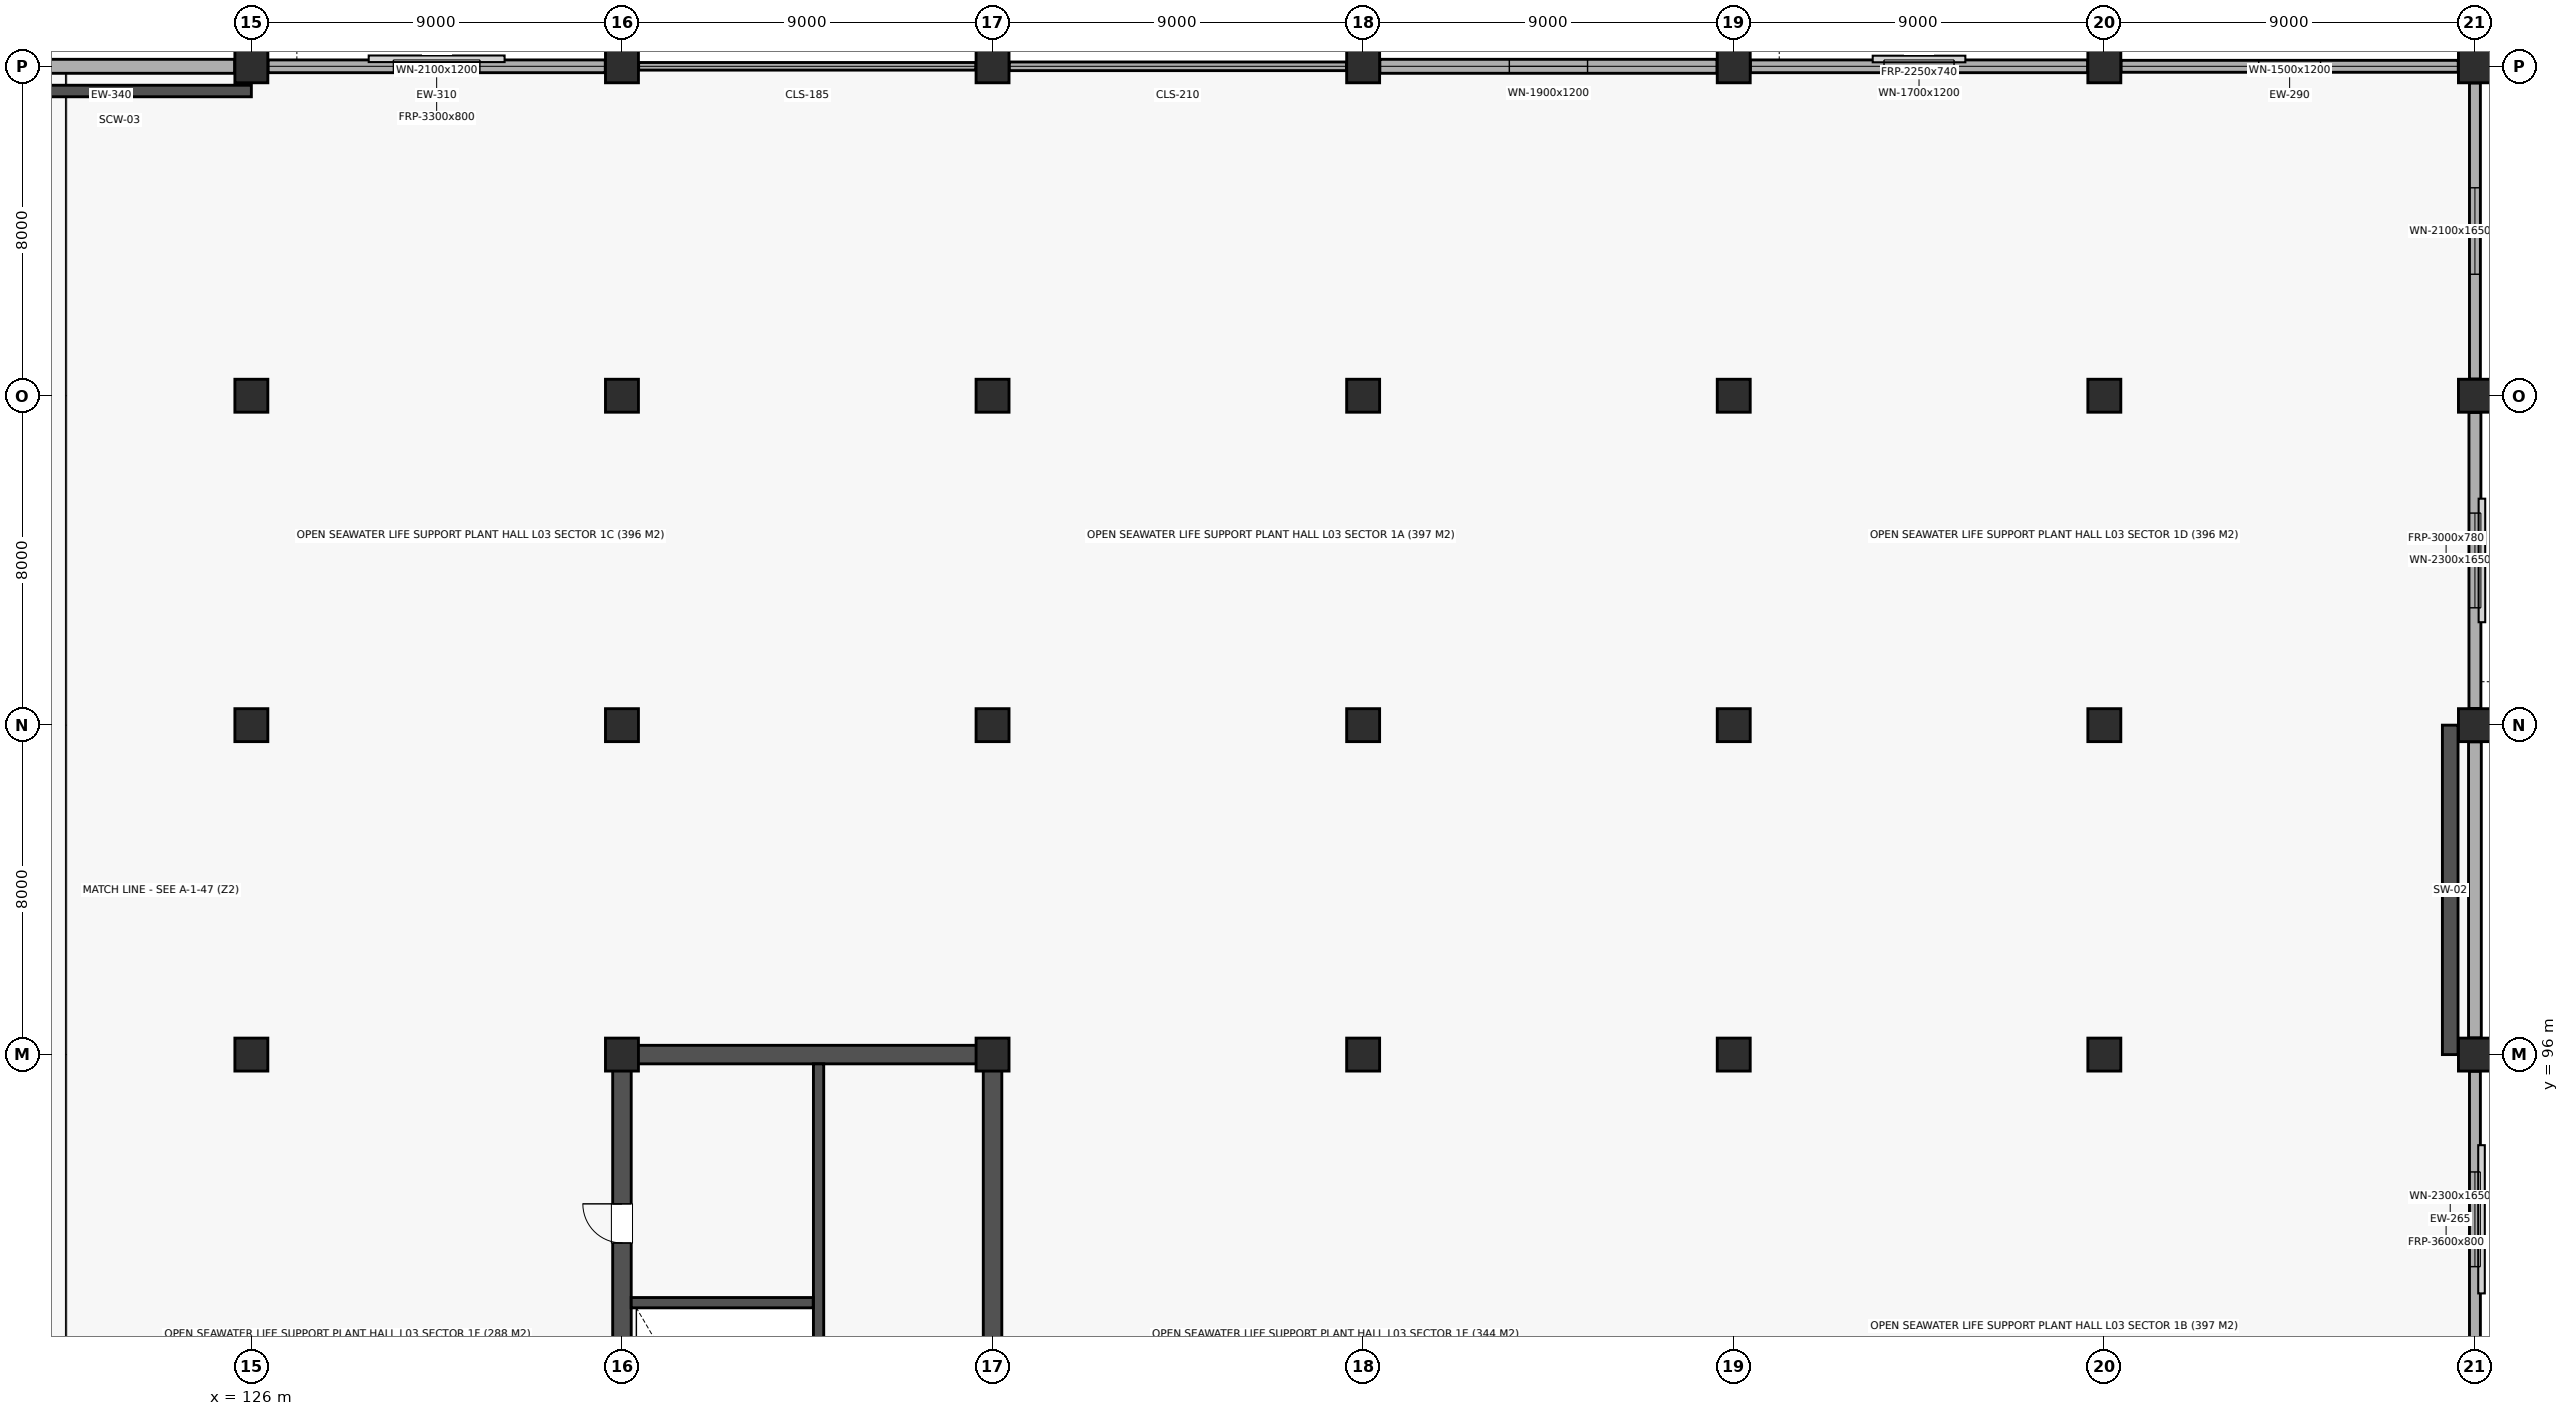
"""IFC4 building model, lengths in metres.
Left out: names, types, materials, properties, quantities, classifications, styles, units other than length and angle.
Written with IfcOpenShell. Run it as: python <this file> out.ifc"""

import sys

from ifc_helpers import new_model, si_unit, direction, frame, frame_2d, origin, origin_2d, place, context, subcontext, project, spatial, rectangle, extrude, element, fill, save


model = new_model("IFC4")
c1 = context("Model", 3, precision=1e-05, world=origin(), true_north=direction((0.0, 1.0)))
c2 = subcontext(c1, "Body", "Model", "MODEL_VIEW")
j1 = project(units=[si_unit("LENGTHUNIT", "METRE"), si_unit("PLANEANGLEUNIT", "RADIAN")], contexts=[c1])
p1 = place(None, origin())
s1 = spatial("IfcSite", under=j1, at=p1, CompositionType="ELEMENT")
p2 = place(p1, origin())
s2 = spatial("IfcBuilding", under=s1, at=p2, CompositionType="ELEMENT")
p3 = place(p2, frame((0.0, 0.0, 13.5)))
s3 = spatial("IfcBuildingStorey", under=s2, at=p3, CompositionType="ELEMENT", Elevation=13.5)
for number, where, z_axis, x_axis in (
    (1, (126.0, 96.0, 0.0), (0.0, 0.0, 1.0), (1.0, 0.0, 0.0)),
    (2, (126.0, 104.0, 0.0), (0.0, 0.0, 1.0), (1.0, 0.0, 0.0)),
    (3, (126.0, 112.0, 0.0), (0.0, 0.0, 1.0), (1.0, 0.0, 0.0)),
):
    element("IfcColumn", number, at=place(p3, frame(where, z_axis=z_axis, x_axis=x_axis)), inside=s3, PredefinedType="COLUMN", context=c2, shape_type="SweptSolid", body=[
        extrude(rectangle(XDim=0.8, YDim=0.8, at=origin_2d()), origin(), (0.0, 0.0, 1.0), 4.23),
    ])
p4 = place(p3, frame((126.0, 120.0, 0.0), z_axis=(0.0, 0.0, 1.0), x_axis=(1.0, 0.0, 0.0)))
e4 = element("IfcColumn", 4, at=p4, inside=s3, PredefinedType="COLUMN", context=c2, shape_type="SweptSolid", body=[
    extrude(rectangle(XDim=0.8, YDim=0.8, at=origin_2d()), origin(), (0.0, 0.0, 1.0), 4.2),
])
for number, where, z_axis, x_axis in (
    (5, (135.0, 96.0, 0.0), (0.0, 0.0, 1.0), (1.0, 0.0, 0.0)),
    (6, (135.0, 104.0, 0.0), (0.0, 0.0, 1.0), (1.0, 0.0, 0.0)),
    (7, (135.0, 112.0, 0.0), (0.0, 0.0, 1.0), (1.0, 0.0, 0.0)),
):
    element("IfcColumn", number, at=place(p3, frame(where, z_axis=z_axis, x_axis=x_axis)), inside=s3, PredefinedType="COLUMN", context=c2, shape_type="SweptSolid", body=[
        extrude(rectangle(XDim=0.8, YDim=0.8, at=origin_2d()), origin(), (0.0, 0.0, 1.0), 4.23),
    ])
for number, where, z_axis, x_axis in (
    (8, (135.0, 120.0, 0.0), (0.0, 0.0, 1.0), (1.0, 0.0, 0.0)),
    (9, (144.0, 96.0, 0.0), (0.0, 0.0, 1.0), (1.0, 0.0, 0.0)),
    (10, (144.0, 104.0, 0.0), (0.0, 0.0, 1.0), (1.0, 0.0, 0.0)),
    (11, (144.0, 112.0, 0.0), (0.0, 0.0, 1.0), (1.0, 0.0, 0.0)),
    (12, (144.0, 120.0, 0.0), (0.0, 0.0, 1.0), (1.0, 0.0, 0.0)),
    (13, (153.0, 96.0, 0.0), (0.0, 0.0, 1.0), (1.0, 0.0, 0.0)),
    (14, (153.0, 104.0, 0.0), (0.0, 0.0, 1.0), (1.0, 0.0, 0.0)),
    (15, (153.0, 112.0, 0.0), (0.0, 0.0, 1.0), (1.0, 0.0, 0.0)),
    (16, (153.0, 120.0, 0.0), (0.0, 0.0, 1.0), (1.0, 0.0, 0.0)),
    (17, (162.0, 96.0, 0.0), (0.0, 0.0, 1.0), (1.0, 0.0, 0.0)),
    (18, (162.0, 104.0, 0.0), (0.0, 0.0, 1.0), (1.0, 0.0, 0.0)),
    (19, (162.0, 112.0, 0.0), (0.0, 0.0, 1.0), (1.0, 0.0, 0.0)),
    (20, (162.0, 120.0, 0.0), (0.0, 0.0, 1.0), (1.0, 0.0, 0.0)),
    (21, (171.0, 96.0, 0.0), (0.0, 0.0, 1.0), (1.0, 0.0, 0.0)),
    (22, (171.0, 104.0, 0.0), (0.0, 0.0, 1.0), (1.0, 0.0, 0.0)),
    (23, (171.0, 112.0, 0.0), (0.0, 0.0, 1.0), (1.0, 0.0, 0.0)),
    (24, (171.0, 120.0, 0.0), (0.0, 0.0, 1.0), (1.0, 0.0, 0.0)),
    (25, (180.0, 96.0, 0.0), (0.0, 0.0, 1.0), (1.0, 0.0, 0.0)),
    (26, (180.0, 104.0, 0.0), (0.0, 0.0, 1.0), (1.0, 0.0, 0.0)),
    (27, (180.0, 112.0, 0.0), (0.0, 0.0, 1.0), (1.0, 0.0, 0.0)),
    (28, (180.0, 120.0, 0.0), (0.0, 0.0, 1.0), (1.0, 0.0, 0.0)),
):
    element("IfcColumn", number, at=place(p3, frame(where, z_axis=z_axis, x_axis=x_axis)), inside=s3, PredefinedType="COLUMN", context=c2, shape_type="SweptSolid", body=[
        extrude(rectangle(XDim=0.8, YDim=0.8, at=origin_2d()), origin(), (0.0, 0.0, 1.0), 4.2),
    ])
p5 = place(p3, frame((179.4, 96.0, 0.0), z_axis=(0.0, 0.0, 1.0), x_axis=(0.0, 1.0, 0.0)))
e29 = element("IfcWall", 29, at=p5, inside=s3, PredefinedType="SHEAR", context=c2, shape_type="SweptSolid", body=[
    extrude(rectangle(XDim=8.0, YDim=0.38, at=frame_2d((4.0, 0.0))), origin(), (0.0, 0.0, 1.0), 4.2),
])
p6 = place(p3, frame((117.0, 119.4, 0.0), z_axis=(0.0, 0.0, 1.0), x_axis=(1.0, 0.0, 0.0)))
e30 = element("IfcWall", 30, at=p6, inside=s3, PredefinedType="SOLIDWALL", context=c2, shape_type="SweptSolid", body=[
    extrude(rectangle(XDim=9.0, YDim=0.28, at=frame_2d((4.5, 0.0))), origin(), (0.0, 0.0, 1.0), 4.2),
])
p7 = place(p3, frame((135.225, 96.0, 0.0), z_axis=(0.0, 0.0, 1.0), x_axis=(1.0, 0.0, 0.0)))
e31 = element("IfcWall", 31, at=p7, inside=s3, PredefinedType="SHEAR", context=c2, shape_type="SweptSolid", body=[
    extrude(rectangle(XDim=8.55, YDim=0.45, at=frame_2d((4.275, 0.0))), origin(), (0.0, 0.0, 1.0), 4.2),
])
p8 = place(p3, frame((135.0, 80.225, 0.0), z_axis=(0.0, 0.0, 1.0), x_axis=(0.0, 1.0, 0.0)))
e32 = element("IfcWall", 32, at=p8, inside=s3, PredefinedType="SHEAR", context=c2, shape_type="SweptSolid", body=[
    extrude(rectangle(XDim=15.55, YDim=0.45, at=frame_2d((7.775, 0.0))), origin(), (0.0, 0.0, 1.0), 4.2),
])
p9 = place(p8, frame((11.2, 0.0, 0.0)))
e33 = element("IfcOpeningElement", 33, at=p9, cuts=e32, PredefinedType="OPENING", context=c2, shape_type="SweptSolid", body=[
    extrude(rectangle(XDim=0.95, YDim=2.1, at=frame_2d((0.475, 1.05))), frame((0.0, 0.237, 0.0), z_axis=(0.0, -1.0, 0.0), x_axis=(1.0, 0.0, 0.0)), (0.0, 0.0, 1.0), 0.474),
])
p10 = place(p3, frame((144.0, 80.225, 0.0), z_axis=(0.0, 0.0, 1.0), x_axis=(0.0, 1.0, 0.0)))
e34 = element("IfcWall", 34, at=p10, inside=s3, PredefinedType="SHEAR", context=c2, shape_type="SweptSolid", body=[
    extrude(rectangle(XDim=15.55, YDim=0.45, at=frame_2d((7.775, 0.0))), origin(), (0.0, 0.0, 1.0), 4.2),
])
p11 = place(p3, frame((139.775, 80.225, 0.0), z_axis=(0.0, 0.0, 1.0), x_axis=(0.0, 1.0, 0.0)))
e35 = element("IfcWall", 35, at=p11, inside=s3, PredefinedType="SOLIDWALL", context=c2, shape_type="SweptSolid", body=[
    extrude(rectangle(XDim=15.55, YDim=0.25, at=frame_2d((7.775, 0.0))), origin(), (0.0, 0.0, 1.0), 4.2),
])
p12 = place(p11, frame((0.45, 0.0, 0.0)))
e36 = element("IfcOpeningElement", 36, at=p12, cuts=e35, PredefinedType="OPENING", context=c2, shape_type="SweptSolid", body=[
    extrude(rectangle(XDim=1.1, YDim=2.15, at=frame_2d((0.55, 1.075))), frame((0.0, 0.137, 0.0), z_axis=(0.0, -1.0, 0.0), x_axis=(1.0, 0.0, 0.0)), (0.0, 0.0, 1.0), 0.274),
])
p13 = place(p3, frame((135.225, 89.975, 0.0), z_axis=(0.0, 0.0, 1.0), x_axis=(1.0, 0.0, 0.0)))
e37 = element("IfcWall", 37, at=p13, inside=s3, PredefinedType="SOLIDWALL", context=c2, shape_type="SweptSolid", body=[
    extrude(rectangle(XDim=4.42, YDim=0.25, at=frame_2d((2.21, 0.0))), origin(), (0.0, 0.0, 1.0), 4.2),
])
p14 = place(p3, frame((117.405, 120.0, 0.0), z_axis=(0.0, 0.0, 1.0), x_axis=(1.0, 0.0, 0.0)))
e38 = element("IfcWall", 38, at=p14, inside=s3, PredefinedType="STANDARD", context=c2, shape_type="SweptSolid", body=[
    extrude(rectangle(XDim=8.19, YDim=0.34, at=frame_2d((4.095, 0.0))), origin(), (0.0, 0.0, 1.0), 3.48),
])
p15 = place(p3, frame((126.405, 120.0, 0.0), z_axis=(0.0, 0.0, 1.0), x_axis=(1.0, 0.0, 0.0)))
e39 = element("IfcWall", 39, at=p15, inside=s3, PredefinedType="STANDARD", context=c2, shape_type="SweptSolid", body=[
    extrude(rectangle(XDim=8.19, YDim=0.31, at=frame_2d((4.095, 0.0))), origin(), (0.0, 0.0, 1.0), 3.48),
])
p16 = place(p15, frame((3.045, 0.0, 0.85)))
e40 = element("IfcOpeningElement", 40, at=p16, cuts=e39, PredefinedType="OPENING", context=c2, shape_type="SweptSolid", body=[
    extrude(rectangle(XDim=2.1, YDim=1.2, at=frame_2d((1.05, 0.6))), frame((0.0, 0.167, 0.0), z_axis=(0.0, -1.0, 0.0), x_axis=(1.0, 0.0, 0.0)), (0.0, 0.0, 1.0), 0.334),
])
p17 = place(p3, frame((135.405, 120.0, 0.0), z_axis=(0.0, 0.0, 1.0), x_axis=(1.0, 0.0, 0.0)))
e41 = element("IfcWall", 41, at=p17, inside=s3, PredefinedType="ELEMENTEDWALL", context=c2, shape_type="SweptSolid", body=[
    extrude(rectangle(XDim=8.19, YDim=0.185, at=frame_2d((4.095, 0.0))), origin(), (0.0, 0.0, 1.0), 3.48),
])
p18 = place(p3, frame((144.405, 120.0, 0.0), z_axis=(0.0, 0.0, 1.0), x_axis=(1.0, 0.0, 0.0)))
e42 = element("IfcWall", 42, at=p18, inside=s3, PredefinedType="ELEMENTEDWALL", context=c2, shape_type="SweptSolid", body=[
    extrude(rectangle(XDim=8.19, YDim=0.21, at=frame_2d((4.095, 0.0))), origin(), (0.0, 0.0, 1.0), 3.48),
])
p19 = place(p3, frame((153.405, 120.0, 0.0), z_axis=(0.0, 0.0, 1.0), x_axis=(1.0, 0.0, 0.0)))
e43 = element("IfcWall", 43, at=p19, inside=s3, PredefinedType="STANDARD", context=c2, shape_type="SweptSolid", body=[
    extrude(rectangle(XDim=8.19, YDim=0.34, at=frame_2d((4.095, 0.0))), origin(), (0.0, 0.0, 1.0), 3.48),
])
p20 = place(p19, frame((3.145, 0.0, 0.85)))
e44 = element("IfcOpeningElement", 44, at=p20, cuts=e43, PredefinedType="OPENING", context=c2, shape_type="SweptSolid", body=[
    extrude(rectangle(XDim=1.9, YDim=1.2, at=frame_2d((0.95, 0.6))), frame((0.0, 0.182, 0.0), z_axis=(0.0, -1.0, 0.0), x_axis=(1.0, 0.0, 0.0)), (0.0, 0.0, 1.0), 0.364),
])
p21 = place(p3, frame((162.405, 120.0, 0.0), z_axis=(0.0, 0.0, 1.0), x_axis=(1.0, 0.0, 0.0)))
e45 = element("IfcWall", 45, at=p21, inside=s3, PredefinedType="STANDARD", context=c2, shape_type="SweptSolid", body=[
    extrude(rectangle(XDim=8.19, YDim=0.31, at=frame_2d((4.095, 0.0))), origin(), (0.0, 0.0, 1.0), 3.48),
])
p22 = place(p21, frame((3.245, 0.0, 0.85)))
e46 = element("IfcOpeningElement", 46, at=p22, cuts=e45, PredefinedType="OPENING", context=c2, shape_type="SweptSolid", body=[
    extrude(rectangle(XDim=1.7, YDim=1.2, at=frame_2d((0.85, 0.6))), frame((0.0, 0.167, 0.0), z_axis=(0.0, -1.0, 0.0), x_axis=(1.0, 0.0, 0.0)), (0.0, 0.0, 1.0), 0.334),
])
p23 = place(p3, frame((171.405, 120.0, 0.0), z_axis=(0.0, 0.0, 1.0), x_axis=(1.0, 0.0, 0.0)))
e47 = element("IfcWall", 47, at=p23, inside=s3, PredefinedType="STANDARD", context=c2, shape_type="SweptSolid", body=[
    extrude(rectangle(XDim=8.19, YDim=0.29, at=frame_2d((4.095, 0.0))), origin(), (0.0, 0.0, 1.0), 3.48),
])
p24 = place(p23, frame((3.345, 0.0, 0.85)))
e48 = element("IfcOpeningElement", 48, at=p24, cuts=e47, PredefinedType="OPENING", context=c2, shape_type="SweptSolid", body=[
    extrude(rectangle(XDim=1.5, YDim=1.2, at=frame_2d((0.75, 0.6))), frame((0.0, 0.157, 0.0), z_axis=(0.0, -1.0, 0.0), x_axis=(1.0, 0.0, 0.0)), (0.0, 0.0, 1.0), 0.314),
])
p25 = place(p3, frame((180.0, 88.405, 0.0), z_axis=(0.0, 0.0, 1.0), x_axis=(0.0, 1.0, 0.0)))
e49 = element("IfcWall", 49, at=p25, inside=s3, PredefinedType="STANDARD", context=c2, shape_type="SweptSolid", body=[
    extrude(rectangle(XDim=7.19, YDim=0.265, at=frame_2d((3.595, 0.0))), origin(), (0.0, 0.0, 1.0), 3.48),
])
p26 = place(p25, frame((2.445, 0.0, 0.85)))
e50 = element("IfcOpeningElement", 50, at=p26, cuts=e49, PredefinedType="OPENING", context=c2, shape_type="SweptSolid", body=[
    extrude(rectangle(XDim=2.3, YDim=1.65, at=frame_2d((1.15, 0.825))), frame((0.0, 0.145, 0.0), z_axis=(0.0, -1.0, 0.0), x_axis=(1.0, 0.0, 0.0)), (0.0, 0.0, 1.0), 0.289),
])
p27 = place(p3, frame((180.0, 96.405, 0.0), z_axis=(0.0, 0.0, 1.0), x_axis=(0.0, 1.0, 0.0)))
e51 = element("IfcWall", 51, at=p27, inside=s3, PredefinedType="STANDARD", context=c2, shape_type="SweptSolid", body=[
    extrude(rectangle(XDim=7.19, YDim=0.31, at=frame_2d((3.595, 0.0))), origin(), (0.0, 0.0, 1.0), 3.48),
])
p28 = place(p3, frame((180.0, 104.405, 0.0), z_axis=(0.0, 0.0, 1.0), x_axis=(0.0, 1.0, 0.0)))
e52 = element("IfcWall", 52, at=p28, inside=s3, PredefinedType="STANDARD", context=c2, shape_type="SweptSolid", body=[
    extrude(rectangle(XDim=7.19, YDim=0.29, at=frame_2d((3.595, 0.0))), origin(), (0.0, 0.0, 1.0), 3.48),
])
p29 = place(p28, frame((2.445, 0.0, 0.85)))
e53 = element("IfcOpeningElement", 53, at=p29, cuts=e52, PredefinedType="OPENING", context=c2, shape_type="SweptSolid", body=[
    extrude(rectangle(XDim=2.3, YDim=1.65, at=frame_2d((1.15, 0.825))), frame((0.0, 0.157, 0.0), z_axis=(0.0, -1.0, 0.0), x_axis=(1.0, 0.0, 0.0)), (0.0, 0.0, 1.0), 0.314),
])
p30 = place(p3, frame((180.0, 112.405, 0.0), z_axis=(0.0, 0.0, 1.0), x_axis=(0.0, 1.0, 0.0)))
e54 = element("IfcWall", 54, at=p30, inside=s3, PredefinedType="STANDARD", context=c2, shape_type="SweptSolid", body=[
    extrude(rectangle(XDim=7.19, YDim=0.265, at=frame_2d((3.595, 0.0))), origin(), (0.0, 0.0, 1.0), 3.48),
])
p31 = place(p30, frame((2.545, 0.0, 0.85)))
e55 = element("IfcOpeningElement", 55, at=p31, cuts=e54, PredefinedType="OPENING", context=c2, shape_type="SweptSolid", body=[
    extrude(rectangle(XDim=2.1, YDim=1.65, at=frame_2d((1.05, 0.825))), frame((0.0, 0.145, 0.0), z_axis=(0.0, -1.0, 0.0), x_axis=(1.0, 0.0, 0.0)), (0.0, 0.0, 1.0), 0.289),
])
p32 = place(p9, origin())
e56 = element("IfcDoor", 56, at=p32, inside=s3, OperationType="SINGLE_SWING_RIGHT", PredefinedType="DOOR", context=c2, shape_type="SweptSolid", body=[
    extrude(rectangle(XDim=0.95, YDim=2.1, at=frame_2d((0.475, 1.05))), frame((0.0, 0.025, 0.0), z_axis=(0.0, -1.0, 0.0), x_axis=(1.0, 0.0, 0.0)), (0.0, 0.0, 1.0), 0.05),
])
fill(e33, e56)
p33 = place(p16, origin())
e57 = element("IfcWindow", 57, at=p33, inside=s3, PartitioningType="SINGLE_PANEL", PredefinedType="WINDOW", context=c2, shape_type="SweptSolid", body=[
    extrude(rectangle(XDim=2.1, YDim=1.2, at=frame_2d((1.05, 0.6))), frame((0.0, 0.03, 0.0), z_axis=(0.0, -1.0, 0.0), x_axis=(1.0, 0.0, 0.0)), (0.0, 0.0, 1.0), 0.06),
])
fill(e40, e57)
p34 = place(p20, origin())
e58 = element("IfcWindow", 58, at=p34, inside=s3, PartitioningType="SINGLE_PANEL", PredefinedType="WINDOW", context=c2, shape_type="SweptSolid", body=[
    extrude(rectangle(XDim=1.9, YDim=1.2, at=frame_2d((0.95, 0.6))), frame((0.0, 0.03, 0.0), z_axis=(0.0, -1.0, 0.0), x_axis=(1.0, 0.0, 0.0)), (0.0, 0.0, 1.0), 0.06),
])
fill(e44, e58)
p35 = place(p22, origin())
e59 = element("IfcWindow", 59, at=p35, inside=s3, PartitioningType="SINGLE_PANEL", PredefinedType="WINDOW", context=c2, shape_type="SweptSolid", body=[
    extrude(rectangle(XDim=1.7, YDim=1.2, at=frame_2d((0.85, 0.6))), frame((0.0, 0.03, 0.0), z_axis=(0.0, -1.0, 0.0), x_axis=(1.0, 0.0, 0.0)), (0.0, 0.0, 1.0), 0.06),
])
fill(e46, e59)
p36 = place(p24, origin())
e60 = element("IfcWindow", 60, at=p36, inside=s3, PartitioningType="SINGLE_PANEL", PredefinedType="WINDOW", context=c2, shape_type="SweptSolid", body=[
    extrude(rectangle(XDim=1.5, YDim=1.2, at=frame_2d((0.75, 0.6))), frame((0.0, 0.03, 0.0), z_axis=(0.0, -1.0, 0.0), x_axis=(1.0, 0.0, 0.0)), (0.0, 0.0, 1.0), 0.06),
])
fill(e48, e60)
p37 = place(p26, origin())
e61 = element("IfcWindow", 61, at=p37, inside=s3, PartitioningType="SINGLE_PANEL", PredefinedType="WINDOW", context=c2, shape_type="SweptSolid", body=[
    extrude(rectangle(XDim=2.3, YDim=1.65, at=frame_2d((1.15, 0.825))), frame((0.0, 0.03, 0.0), z_axis=(0.0, -1.0, 0.0), x_axis=(1.0, 0.0, 0.0)), (0.0, 0.0, 1.0), 0.06),
])
fill(e50, e61)
p38 = place(p29, origin())
e62 = element("IfcWindow", 62, at=p38, inside=s3, PartitioningType="SINGLE_PANEL", PredefinedType="WINDOW", context=c2, shape_type="SweptSolid", body=[
    extrude(rectangle(XDim=2.3, YDim=1.65, at=frame_2d((1.15, 0.825))), frame((0.0, 0.03, 0.0), z_axis=(0.0, -1.0, 0.0), x_axis=(1.0, 0.0, 0.0)), (0.0, 0.0, 1.0), 0.06),
])
fill(e53, e62)
p39 = place(p31, origin())
e63 = element("IfcWindow", 63, at=p39, inside=s3, PartitioningType="SINGLE_PANEL", PredefinedType="WINDOW", context=c2, shape_type="SweptSolid", body=[
    extrude(rectangle(XDim=2.1, YDim=1.65, at=frame_2d((1.05, 0.825))), frame((0.0, 0.03, 0.0), z_axis=(0.0, -1.0, 0.0), x_axis=(1.0, 0.0, 0.0)), (0.0, 0.0, 1.0), 0.06),
])
fill(e55, e63)
save(model, sys.argv[1])
